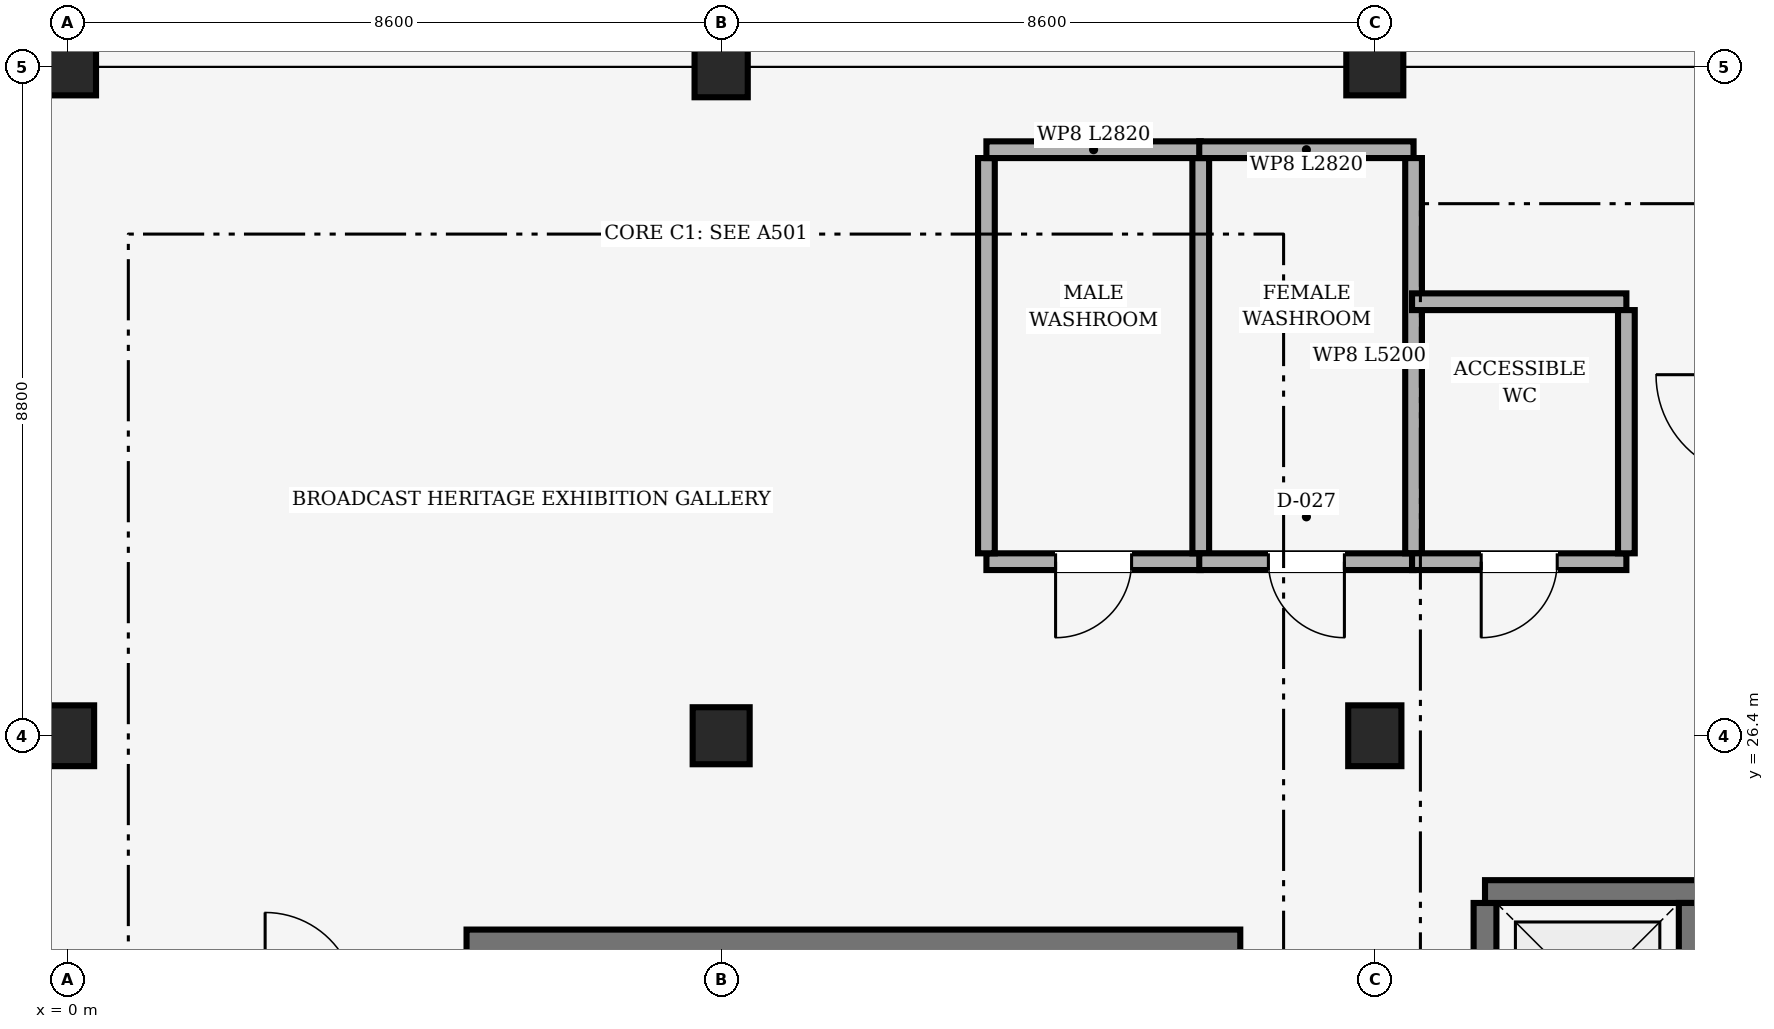
"""IFC4 building model, lengths in metres.
Left out: names, types, materials, properties, quantities, classifications, styles, units other than length and angle.
Written with IfcOpenShell. Run it as: python <this file> out.ifc"""

import sys

from ifc_helpers import new_model, si_unit, direction, frame, frame_2d, origin, origin_2d, place, context, subcontext, project, spatial, rectangle, extrude, element, fill, save


model = new_model("IFC4")
c1 = context("Model", 3, precision=1e-05, world=origin(), true_north=direction((0.0, 1.0)))
c2 = subcontext(c1, "Body", "Model", "MODEL_VIEW")
j1 = project(units=[si_unit("LENGTHUNIT", "METRE"), si_unit("PLANEANGLEUNIT", "RADIAN")], contexts=[c1])
p1 = place(None, origin())
s1 = spatial("IfcSite", under=j1, at=p1, CompositionType="ELEMENT")
p2 = place(p1, origin())
s2 = spatial("IfcBuilding", under=s1, at=p2, CompositionType="ELEMENT")
p3 = place(p2, frame((0.0, 0.0, 12.0)))
s3 = spatial("IfcBuildingStorey", under=s2, at=p3, CompositionType="ELEMENT", Elevation=12.0)
p4 = place(p3, frame((0.0, 26.4, 0.0), z_axis=(0.0, 0.0, 1.0), x_axis=(1.0, 0.0, 0.0)))
e1 = element("IfcColumn", 1, at=p4, inside=s3, PredefinedType="COLUMN", context=c2, shape_type="SweptSolid", body=[
    extrude(rectangle(XDim=0.7, YDim=0.8, at=origin_2d()), origin(), (0.0, 0.0, 1.0), 3.35),
])
for number, where, z_axis, x_axis in (
    (2, (0.0, 35.2, 0.0), (0.0, 0.0, 1.0), (1.0, 0.0, 0.0)),
    (3, (8.6, 26.4, 0.0), (0.0, 0.0, 1.0), (1.0, 0.0, 0.0)),
):
    element("IfcColumn", number, at=place(p3, frame(where, z_axis=z_axis, x_axis=x_axis)), inside=s3, PredefinedType="COLUMN", context=c2, shape_type="SweptSolid", body=[
        extrude(rectangle(XDim=0.75, YDim=0.75, at=origin_2d()), origin(), (0.0, 0.0, 1.0), 3.35),
    ])
for number, where, z_axis, x_axis in (
    (4, (8.6, 35.2, 0.0), (0.0, 0.0, 1.0), (1.0, 0.0, 0.0)),
    (5, (17.2, 26.4, 0.0), (0.0, 0.0, 1.0), (1.0, 0.0, 0.0)),
):
    element("IfcColumn", number, at=place(p3, frame(where, z_axis=z_axis, x_axis=x_axis)), inside=s3, PredefinedType="COLUMN", context=c2, shape_type="SweptSolid", body=[
        extrude(rectangle(XDim=0.7, YDim=0.8, at=origin_2d()), origin(), (0.0, 0.0, 1.0), 3.35),
    ])
p5 = place(p3, frame((17.2, 35.2, 0.0), z_axis=(0.0, 0.0, 1.0), x_axis=(1.0, 0.0, 0.0)))
e6 = element("IfcColumn", 6, at=p5, inside=s3, PredefinedType="COLUMN", context=c2, shape_type="SweptSolid", body=[
    extrude(rectangle(XDim=0.75, YDim=0.75, at=origin_2d()), origin(), (0.0, 0.0, 1.0), 3.35),
])
p6 = place(p3, frame((5.25, 23.7, 0.0), z_axis=(0.0, 0.0, 1.0), x_axis=(1.0, 0.0, 0.0)))
e7 = element("IfcWall", 7, at=p6, inside=s3, PredefinedType="SHEAR", context=c2, shape_type="SweptSolid", body=[
    extrude(rectangle(XDim=10.18, YDim=0.3, at=frame_2d((5.09, 0.0))), origin(), (0.0, 0.0, 1.0), 3.35),
])
p7 = place(p3, frame((18.65, 21.8, 0.0), z_axis=(0.0, 0.0, 1.0), x_axis=(0.0, 1.0, 0.0)))
e8 = element("IfcWall", 8, at=p7, inside=s3, PredefinedType="SHEAR", context=c2, shape_type="SweptSolid", body=[
    extrude(rectangle(XDim=2.4, YDim=0.3, at=frame_2d((1.2, 0.0))), origin(), (0.0, 0.0, 1.0), 3.35),
])
p8 = place(p3, frame((18.65, 24.35, 0.0), z_axis=(0.0, 0.0, 1.0), x_axis=(1.0, 0.0, 0.0)))
e9 = element("IfcWall", 9, at=p8, inside=s3, PredefinedType="SHEAR", context=c2, shape_type="SweptSolid", body=[
    extrude(rectangle(XDim=2.95, YDim=0.3, at=frame_2d((1.475, 0.0))), origin(), (0.0, 0.0, 1.0), 3.35),
])
p9 = place(p3, frame((21.35, 24.2, 0.0), z_axis=(0.0, 0.0, 1.0), x_axis=(0.0, -1.0, 0.0)))
e10 = element("IfcWall", 10, at=p9, inside=s3, PredefinedType="SHEAR", context=c2, shape_type="SweptSolid", body=[
    extrude(rectangle(XDim=2.4, YDim=0.3, at=frame_2d((1.2, 0.0))), origin(), (0.0, 0.0, 1.0), 3.35),
])
p10 = place(p3, frame((14.91, 28.69, 0.0), z_axis=(0.0, 0.0, 1.0), x_axis=(-1.0, 0.0, 0.0)))
e11 = element("IfcWall", 11, at=p10, inside=s3, PredefinedType="PLUMBINGWALL", context=c2, shape_type="SweptSolid", body=[
    extrude(rectangle(XDim=2.82, YDim=0.22, at=frame_2d((1.41, 0.0))), origin(), (0.0, 0.0, 1.0), 3.33),
])
p11 = place(p10, frame((0.91, 0.0, 0.0)))
e12 = element("IfcOpeningElement", 12, at=p11, cuts=e11, PredefinedType="OPENING", context=c2, shape_type="SweptSolid", body=[
    extrude(rectangle(XDim=1.0, YDim=2.1, at=frame_2d((0.5, 1.05))), frame((0.0, 0.11, 0.0), z_axis=(0.0, -1.0, 0.0), x_axis=(1.0, 0.0, 0.0)), (0.0, 0.0, 1.0), 0.22),
])
p12 = place(p3, frame((12.09, 28.8, 0.0), z_axis=(0.0, 0.0, 1.0), x_axis=(0.0, 1.0, 0.0)))
e13 = element("IfcWall", 13, at=p12, inside=s3, PredefinedType="PLUMBINGWALL", context=c2, shape_type="SweptSolid", body=[
    extrude(rectangle(XDim=5.2, YDim=0.22, at=frame_2d((2.6, 0.0))), origin(), (0.0, 0.0, 1.0), 3.33),
])
p13 = place(p3, frame((12.09, 34.11, 0.0), z_axis=(0.0, 0.0, 1.0), x_axis=(1.0, 0.0, 0.0)))
e14 = element("IfcWall", 14, at=p13, inside=s3, PredefinedType="PLUMBINGWALL", context=c2, shape_type="SweptSolid", body=[
    extrude(rectangle(XDim=2.82, YDim=0.22, at=frame_2d((1.41, 0.0))), origin(), (0.0, 0.0, 1.0), 3.33),
])
p14 = place(p3, frame((14.91, 34.0, 0.0), z_axis=(0.0, 0.0, 1.0), x_axis=(0.0, -1.0, 0.0)))
e15 = element("IfcWall", 15, at=p14, inside=s3, PredefinedType="PLUMBINGWALL", context=c2, shape_type="SweptSolid", body=[
    extrude(rectangle(XDim=5.2, YDim=0.22, at=frame_2d((2.6, 0.0))), origin(), (0.0, 0.0, 1.0), 3.33),
])
p15 = place(p3, frame((17.71, 28.69, 0.0), z_axis=(0.0, 0.0, 1.0), x_axis=(-1.0, 0.0, 0.0)))
e16 = element("IfcWall", 16, at=p15, inside=s3, PredefinedType="PLUMBINGWALL", context=c2, shape_type="SweptSolid", body=[
    extrude(rectangle(XDim=2.82, YDim=0.22, at=frame_2d((1.41, 0.0))), origin(), (0.0, 0.0, 1.0), 3.33),
])
p16 = place(p15, frame((0.91, 0.0, 0.0)))
e17 = element("IfcOpeningElement", 17, at=p16, cuts=e16, PredefinedType="OPENING", context=c2, shape_type="SweptSolid", body=[
    extrude(rectangle(XDim=1.0, YDim=2.1, at=frame_2d((0.5, 1.05))), frame((0.0, 0.11, 0.0), z_axis=(0.0, -1.0, 0.0), x_axis=(1.0, 0.0, 0.0)), (0.0, 0.0, 1.0), 0.22),
])
p17 = place(p3, frame((14.89, 34.11, 0.0), z_axis=(0.0, 0.0, 1.0), x_axis=(1.0, 0.0, 0.0)))
e18 = element("IfcWall", 18, at=p17, inside=s3, PredefinedType="PLUMBINGWALL", context=c2, shape_type="SweptSolid", body=[
    extrude(rectangle(XDim=2.82, YDim=0.22, at=frame_2d((1.41, 0.0))), origin(), (0.0, 0.0, 1.0), 3.33),
])
p18 = place(p3, frame((17.71, 34.0, 0.0), z_axis=(0.0, 0.0, 1.0), x_axis=(0.0, -1.0, 0.0)))
e19 = element("IfcWall", 19, at=p18, inside=s3, PredefinedType="PLUMBINGWALL", context=c2, shape_type="SweptSolid", body=[
    extrude(rectangle(XDim=5.2, YDim=0.22, at=frame_2d((2.6, 0.0))), origin(), (0.0, 0.0, 1.0), 3.33),
])
p19 = place(p3, frame((20.51, 28.69, 0.0), z_axis=(0.0, 0.0, 1.0), x_axis=(-1.0, 0.0, 0.0)))
e20 = element("IfcWall", 20, at=p19, inside=s3, PredefinedType="PLUMBINGWALL", context=c2, shape_type="SweptSolid", body=[
    extrude(rectangle(XDim=2.82, YDim=0.22, at=frame_2d((1.41, 0.0))), origin(), (0.0, 0.0, 1.0), 3.33),
])
p20 = place(p19, frame((0.91, 0.0, 0.0)))
e21 = element("IfcOpeningElement", 21, at=p20, cuts=e20, PredefinedType="OPENING", context=c2, shape_type="SweptSolid", body=[
    extrude(rectangle(XDim=1.0, YDim=2.1, at=frame_2d((0.5, 1.05))), frame((0.0, 0.11, 0.0), z_axis=(0.0, -1.0, 0.0), x_axis=(1.0, 0.0, 0.0)), (0.0, 0.0, 1.0), 0.22),
])
p21 = place(p3, frame((17.69, 32.11, 0.0), z_axis=(0.0, 0.0, 1.0), x_axis=(1.0, 0.0, 0.0)))
e22 = element("IfcWall", 22, at=p21, inside=s3, PredefinedType="PLUMBINGWALL", context=c2, shape_type="SweptSolid", body=[
    extrude(rectangle(XDim=2.82, YDim=0.22, at=frame_2d((1.41, 0.0))), origin(), (0.0, 0.0, 1.0), 3.33),
])
p22 = place(p3, frame((20.51, 32.0, 0.0), z_axis=(0.0, 0.0, 1.0), x_axis=(0.0, -1.0, 0.0)))
e23 = element("IfcWall", 23, at=p22, inside=s3, PredefinedType="PLUMBINGWALL", context=c2, shape_type="SweptSolid", body=[
    extrude(rectangle(XDim=3.2, YDim=0.22, at=frame_2d((1.6, 0.0))), origin(), (0.0, 0.0, 1.0), 3.33),
])
p23 = place(p11, origin())
e24 = element("IfcDoor", 24, at=p23, inside=s3, OperationType="SINGLE_SWING_RIGHT", PredefinedType="DOOR", context=c2, shape_type="SweptSolid", body=[
    extrude(rectangle(XDim=1.0, YDim=2.1, at=frame_2d((0.5, 1.05))), frame((0.0, 0.025, 0.0), z_axis=(0.0, -1.0, 0.0), x_axis=(1.0, 0.0, 0.0)), (0.0, 0.0, 1.0), 0.05),
])
fill(e12, e24)
p24 = place(p16, origin())
e25 = element("IfcDoor", 25, at=p24, inside=s3, OperationType="SINGLE_SWING_LEFT", PredefinedType="DOOR", context=c2, shape_type="SweptSolid", body=[
    extrude(rectangle(XDim=1.0, YDim=2.1, at=frame_2d((0.5, 1.05))), frame((0.0, 0.025, 0.0), z_axis=(0.0, -1.0, 0.0), x_axis=(1.0, 0.0, 0.0)), (0.0, 0.0, 1.0), 0.05),
])
fill(e17, e25)
p25 = place(p20, origin())
e26 = element("IfcDoor", 26, at=p25, inside=s3, OperationType="SINGLE_SWING_RIGHT", PredefinedType="DOOR", context=c2, shape_type="SweptSolid", body=[
    extrude(rectangle(XDim=1.0, YDim=2.1, at=frame_2d((0.5, 1.05))), frame((0.0, 0.025, 0.0), z_axis=(0.0, -1.0, 0.0), x_axis=(1.0, 0.0, 0.0)), (0.0, 0.0, 1.0), 0.05),
])
fill(e21, e26)
save(model, sys.argv[1])
